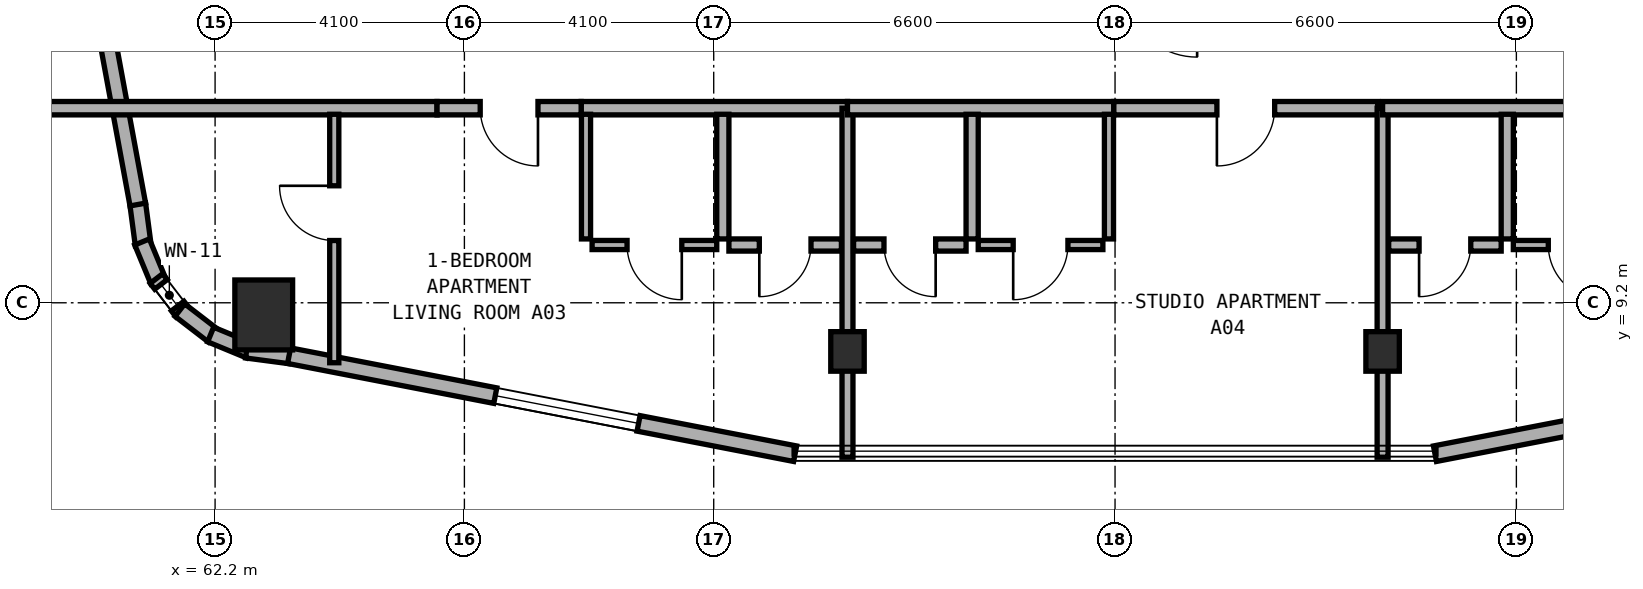
"""IFC4 building model, lengths in metres.
Left out: names, types, materials, properties, quantities, classifications, styles, units other than length and angle.
Written with IfcOpenShell. Run it as: python <this file> out.ifc"""

import sys

from ifc_helpers import new_model, si_unit, direction, frame, frame_2d, origin, origin_2d, place, context, subcontext, project, spatial, rectangle, extrude, element, fill, save


model = new_model("IFC4")
c1 = context("Model", 3, precision=1e-05, world=origin(), true_north=direction((0.0, 1.0)))
c2 = subcontext(c1, "Body", "Model", "MODEL_VIEW")
j1 = project(units=[si_unit("LENGTHUNIT", "METRE"), si_unit("PLANEANGLEUNIT", "RADIAN")], contexts=[c1])
p1 = place(None, origin())
s1 = spatial("IfcSite", under=j1, at=p1, CompositionType="ELEMENT")
p2 = place(p1, origin())
s2 = spatial("IfcBuilding", under=s1, at=p2, CompositionType="ELEMENT")
p3 = place(p2, frame((0.0, 0.0, 109.0)))
s3 = spatial("IfcBuildingStorey", under=s2, at=p3, CompositionType="ELEMENT", Elevation=109.0)
for number, where, z_axis, x_axis in (
    (1, (72.6, 8.4, 0.0), (0.0, 0.0, 1.0), (1.0, 0.0, 0.0)),
    (2, (81.4, 8.4, 0.0), (0.0, 0.0, 1.0), (1.0, 0.0, 0.0)),
):
    element("IfcColumn", number, at=place(p3, frame(where, z_axis=z_axis, x_axis=x_axis)), inside=s3, PredefinedType="COLUMN", context=c2, shape_type="SweptSolid", body=[
        extrude(rectangle(XDim=0.55, YDim=0.65, at=origin_2d()), origin(), (0.0, 0.0, 1.0), 3.5),
    ])
p4 = place(p3, frame((63.0, 9.0, 0.0), z_axis=(0.0, 0.0, 1.0), x_axis=(1.0, 0.0, 0.0)))
e3 = element("IfcColumn", 3, at=p4, inside=s3, PredefinedType="COLUMN", context=c2, shape_type="SweptSolid", body=[
    extrude(rectangle(XDim=0.95, YDim=1.15, at=origin_2d()), origin(), (0.0, 0.0, 1.0), 3.5),
])
p5 = place(p3, frame((60.928, 10.825, 0.0), z_axis=(0.0, 0.0, 1.0), x_axis=(0.131667498923, -0.991293937098, 0.0)))
e4 = element("IfcWall", 4, at=p5, inside=s3, PredefinedType="STANDARD", context=c2, shape_type="SweptSolid", body=[
    extrude(rectangle(XDim=0.677, YDim=0.26, at=frame_2d((0.338, 0.0))), origin(), (0.0, 0.0, 1.0), 3.25),
])
p6 = place(p3, frame((60.999, 10.2, 0.0), z_axis=(0.0, 0.0, 1.0), x_axis=(0.381988976935, -0.924166879681, 0.0)))
e5 = element("IfcWall", 5, at=p6, inside=s3, PredefinedType="STANDARD", context=c2, shape_type="SweptSolid", body=[
    extrude(rectangle(XDim=0.693, YDim=0.26, at=frame_2d((0.347, 0.0))), origin(), (0.0, 0.0, 1.0), 3.25),
])
p7 = place(p3, frame((61.236, 9.599, 0.0), z_axis=(0.0, 0.0, 1.0), x_axis=(0.609472651958, -0.792807092876, 0.0)))
e6 = element("IfcWall", 6, at=p7, inside=s3, PredefinedType="STANDARD", context=c2, shape_type="SweptSolid", body=[
    extrude(rectangle(XDim=0.694, YDim=0.26, at=frame_2d((0.347, 0.0))), origin(), (0.0, 0.0, 1.0), 3.25),
])
p8 = place(p7, frame((0.122, 0.0, 0.85)))
e7 = element("IfcOpeningElement", 7, at=p8, cuts=e6, PredefinedType="OPENING", context=c2, shape_type="SweptSolid", body=[
    extrude(rectangle(XDim=0.45, YDim=1.5, at=frame_2d((0.225, 0.75))), frame((0.0, 0.14, 0.0), z_axis=(0.0, -1.0, 0.0), x_axis=(1.0, 0.0, 0.0)), (0.0, 0.0, 1.0), 0.28),
])
p9 = place(p3, frame((61.621, 9.08, 0.0), z_axis=(0.0, 0.0, 1.0), x_axis=(0.792506234191, -0.609863811657, 0.0)))
e8 = element("IfcWall", 8, at=p9, inside=s3, PredefinedType="STANDARD", context=c2, shape_type="SweptSolid", body=[
    extrude(rectangle(XDim=0.694, YDim=0.26, at=frame_2d((0.347, 0.0))), origin(), (0.0, 0.0, 1.0), 3.25),
])
p10 = place(p3, frame((62.127, 8.678, 0.0), z_axis=(0.0, 0.0, 1.0), x_axis=(0.92421822618, -0.381864727877, 0.0)))
e9 = element("IfcWall", 9, at=p10, inside=s3, PredefinedType="STANDARD", context=c2, shape_type="SweptSolid", body=[
    extrude(rectangle(XDim=0.694, YDim=0.26, at=frame_2d((0.347, 0.0))), origin(), (0.0, 0.0, 1.0), 3.25),
])
p11 = place(p3, frame((62.719, 8.421, 0.0), z_axis=(0.0, 0.0, 1.0), x_axis=(0.991433279471, -0.130614135366, 0.0)))
e10 = element("IfcWall", 10, at=p11, inside=s3, PredefinedType="STANDARD", context=c2, shape_type="SweptSolid", body=[
    extrude(rectangle(XDim=0.712, YDim=0.26, at=frame_2d((0.356, 0.0))), origin(), (0.0, 0.0, 1.0), 3.25),
])
p12 = place(p3, frame((63.417, 8.33, 0.0), z_axis=(0.0, 0.0, 1.0), x_axis=(0.981750199588, -0.190175039396, 0.0)))
e11 = element("IfcWall", 11, at=p12, inside=s3, PredefinedType="STANDARD", context=c2, shape_type="SweptSolid", body=[
    extrude(rectangle(XDim=8.477, YDim=0.26, at=frame_2d((4.238, 0.0))), origin(), (0.0, 0.0, 1.0), 3.25),
])
p13 = place(p12, frame((3.454, 0.0, 0.8)))
e12 = element("IfcOpeningElement", 12, at=p13, cuts=e11, PredefinedType="OPENING", context=c2, shape_type="SweptSolid", body=[
    extrude(rectangle(XDim=2.4, YDim=1.6, at=frame_2d((1.2, 0.8))), frame((0.0, 0.14, 0.0), z_axis=(0.0, -1.0, 0.0), x_axis=(1.0, 0.0, 0.0)), (0.0, 0.0, 1.0), 0.28),
])
p14 = place(p3, frame((82.261, 6.718, 0.0), z_axis=(0.0, 0.0, 1.0), x_axis=(0.981750199588, 0.190175039396, 0.0)))
e13 = element("IfcWall", 13, at=p14, inside=s3, PredefinedType="STANDARD", context=c2, shape_type="SweptSolid", body=[
    extrude(rectangle(XDim=8.477, YDim=0.26, at=frame_2d((4.238, 0.0))), origin(), (0.0, 0.0, 1.0), 3.25),
])
p15 = place(p14, frame((2.623, 0.0, 0.8)))
e14 = element("IfcOpeningElement", 14, at=p15, cuts=e13, PredefinedType="OPENING", context=c2, shape_type="SweptSolid", body=[
    extrude(rectangle(XDim=2.4, YDim=1.6, at=frame_2d((1.2, 0.8))), frame((0.0, 0.14, 0.0), z_axis=(0.0, -1.0, 0.0), x_axis=(1.0, 0.0, 0.0)), (0.0, 0.0, 1.0), 0.28),
])
p16 = place(p3, frame((59.318, 19.558, 0.0), z_axis=(0.0, 0.0, 1.0), x_axis=(0.181209963057, -0.983444431215, 0.0)))
e15 = element("IfcWall", 15, at=p16, inside=s3, PredefinedType="STANDARD", context=c2, shape_type="SweptSolid", body=[
    extrude(rectangle(XDim=8.889, YDim=0.26, at=frame_2d((4.445, 0.0))), origin(), (0.0, 0.0, 1.0), 3.25),
])
p17 = place(p16, frame((1.444, 0.0, 0.8)))
e16 = element("IfcOpeningElement", 16, at=p17, cuts=e15, PredefinedType="OPENING", context=c2, shape_type="SweptSolid", body=[
    extrude(rectangle(XDim=2.4, YDim=1.6, at=frame_2d((1.2, 0.8))), frame((0.0, 0.14, 0.0), z_axis=(0.0, -1.0, 0.0), x_axis=(1.0, 0.0, 0.0)), (0.0, 0.0, 1.0), 0.28),
])
p18 = place(p3, frame((59.36, 12.4, 0.0), z_axis=(0.0, 0.0, 1.0), x_axis=(1.0, 0.0, 0.0)))
e17 = element("IfcWall", 17, at=p18, inside=s3, PredefinedType="SOLIDWALL", context=c2, shape_type="SweptSolid", body=[
    extrude(rectangle(XDim=6.49, YDim=0.22, at=frame_2d((3.245, 0.0))), origin(), (0.0, 0.0, 1.0), 2.945),
])
p19 = place(p3, frame((68.22, 12.4, 0.0), z_axis=(0.0, 0.0, 1.0), x_axis=(1.0, 0.0, 0.0)))
e18 = element("IfcWall", 18, at=p19, inside=s3, PredefinedType="SOLIDWALL", context=c2, shape_type="SweptSolid", body=[
    extrude(rectangle(XDim=4.38, YDim=0.22, at=frame_2d((2.19, 0.0))), origin(), (0.0, 0.0, 1.0), 2.825),
])
p20 = place(p3, frame((65.85, 12.4, 0.0), z_axis=(0.0, 0.0, 1.0), x_axis=(1.0, 0.0, 0.0)))
e19 = element("IfcWall", 19, at=p20, inside=s3, PredefinedType="SOLIDWALL", context=c2, shape_type="SweptSolid", body=[
    extrude(rectangle(XDim=2.37, YDim=0.22, at=frame_2d((1.185, 0.0))), origin(), (0.0, 0.0, 1.0), 3.22),
])
p21 = place(p20, frame((0.71, 0.0, 0.0)))
e20 = element("IfcOpeningElement", 20, at=p21, cuts=e19, PredefinedType="OPENING", context=c2, shape_type="SweptSolid", body=[
    extrude(rectangle(XDim=0.95, YDim=2.1, at=frame_2d((0.475, 1.05))), frame((0.0, 0.12, 0.0), z_axis=(0.0, -1.0, 0.0), x_axis=(1.0, 0.0, 0.0)), (0.0, 0.0, 1.0), 0.24),
])
p22 = place(p3, frame((64.16, 8.214, 0.0), z_axis=(0.0, 0.0, 1.0), x_axis=(0.0, 1.0, 0.0)))
e21 = element("IfcWall", 21, at=p22, inside=s3, PredefinedType="PARTITIONING", context=c2, shape_type="SweptSolid", body=[
    extrude(rectangle(XDim=4.086, YDim=0.15, at=frame_2d((2.043, 0.0))), origin(), (0.0, 0.0, 1.0), 2.945),
])
p23 = place(p22, frame((2.01, 0.0, 0.0)))
e22 = element("IfcOpeningElement", 22, at=p23, cuts=e21, PredefinedType="OPENING", context=c2, shape_type="SweptSolid", body=[
    extrude(rectangle(XDim=0.9, YDim=2.1, at=frame_2d((0.45, 1.05))), frame((0.0, 0.085, 0.0), z_axis=(0.0, -1.0, 0.0), x_axis=(1.0, 0.0, 0.0)), (0.0, 0.0, 1.0), 0.17),
])
p24 = place(p3, frame((70.55, 10.25, 0.0), z_axis=(0.0, 0.0, 1.0), x_axis=(0.0, 1.0, 0.0)))
e23 = element("IfcWall", 23, at=p24, inside=s3, PredefinedType="PLUMBINGWALL", context=c2, shape_type="SweptSolid", body=[
    extrude(rectangle(XDim=2.05, YDim=0.2, at=frame_2d((1.025, 0.0))), origin(), (0.0, 0.0, 1.0), 3.22),
])
p25 = place(p3, frame((68.3, 10.25, 0.0), z_axis=(0.0, 0.0, 1.0), x_axis=(0.0, 1.0, 0.0)))
e24 = element("IfcWall", 24, at=p25, inside=s3, PredefinedType="PARTITIONING", context=c2, shape_type="SweptSolid", body=[
    extrude(rectangle(XDim=2.05, YDim=0.15, at=frame_2d((1.025, 0.0))), origin(), (0.0, 0.0, 1.0), 3.22),
])
p26 = place(p3, frame((70.65, 10.15, 0.0), z_axis=(0.0, 0.0, 1.0), x_axis=(1.0, 0.0, 0.0)))
e25 = element("IfcWall", 25, at=p26, inside=s3, PredefinedType="PLUMBINGWALL", context=c2, shape_type="SweptSolid", body=[
    extrude(rectangle(XDim=1.85, YDim=0.2, at=frame_2d((0.925, 0.0))), origin(), (0.0, 0.0, 1.0), 3.22),
])
p27 = place(p26, frame((0.5, 0.0, 0.0)))
e26 = element("IfcOpeningElement", 26, at=p27, cuts=e25, PredefinedType="OPENING", context=c2, shape_type="SweptSolid", body=[
    extrude(rectangle(XDim=0.85, YDim=2.1, at=frame_2d((0.425, 1.05))), frame((0.0, 0.11, 0.0), z_axis=(0.0, -1.0, 0.0), x_axis=(1.0, 0.0, 0.0)), (0.0, 0.0, 1.0), 0.22),
])
p28 = place(p3, frame((68.4, 10.15, 0.0), z_axis=(0.0, 0.0, 1.0), x_axis=(1.0, 0.0, 0.0)))
e27 = element("IfcWall", 27, at=p28, inside=s3, PredefinedType="PARTITIONING", context=c2, shape_type="SweptSolid", body=[
    extrude(rectangle(XDim=2.05, YDim=0.15, at=frame_2d((1.025, 0.0))), origin(), (0.0, 0.0, 1.0), 3.22),
])
p29 = place(p28, frame((0.575, 0.0, 0.0)))
e28 = element("IfcOpeningElement", 28, at=p29, cuts=e27, PredefinedType="OPENING", context=c2, shape_type="SweptSolid", body=[
    extrude(rectangle(XDim=0.9, YDim=2.1, at=frame_2d((0.45, 1.05))), frame((0.0, 0.085, 0.0), z_axis=(0.0, -1.0, 0.0), x_axis=(1.0, 0.0, 0.0)), (0.0, 0.0, 1.0), 0.17),
])
p30 = place(p3, frame((72.6, 6.66, 0.0), z_axis=(0.0, 0.0, 1.0), x_axis=(0.0, 1.0, 0.0)))
e29 = element("IfcWall", 29, at=p30, inside=s3, PredefinedType="SOLIDWALL", context=c2, shape_type="SweptSolid", body=[
    extrude(rectangle(XDim=5.74, YDim=0.18, at=frame_2d((2.87, 0.0))), origin(), (0.0, 0.0, 1.0), 2.825),
])
p31 = place(p3, frame((72.6, 12.4, 0.0), z_axis=(0.0, 0.0, 1.0), x_axis=(1.0, 0.0, 0.0)))
e30 = element("IfcWall", 30, at=p31, inside=s3, PredefinedType="SOLIDWALL", context=c2, shape_type="SweptSolid", body=[
    extrude(rectangle(XDim=4.38, YDim=0.22, at=frame_2d((2.19, 0.0))), origin(), (0.0, 0.0, 1.0), 2.825),
])
p32 = place(p3, frame((76.98, 12.4, 0.0), z_axis=(0.0, 0.0, 1.0), x_axis=(1.0, 0.0, 0.0)))
e31 = element("IfcWall", 31, at=p32, inside=s3, PredefinedType="SOLIDWALL", context=c2, shape_type="SweptSolid", body=[
    extrude(rectangle(XDim=4.34, YDim=0.22, at=frame_2d((2.17, 0.0))), origin(), (0.0, 0.0, 1.0), 2.825),
])
p33 = place(p32, frame((1.695, 0.0, 0.0)))
e32 = element("IfcOpeningElement", 32, at=p33, cuts=e31, PredefinedType="OPENING", context=c2, shape_type="SweptSolid", body=[
    extrude(rectangle(XDim=0.95, YDim=2.1, at=frame_2d((0.475, 1.05))), frame((0.0, 0.12, 0.0), z_axis=(0.0, -1.0, 0.0), x_axis=(1.0, 0.0, 0.0)), (0.0, 0.0, 1.0), 0.24),
])
p34 = place(p3, frame((74.65, 10.25, 0.0), z_axis=(0.0, 0.0, 1.0), x_axis=(0.0, 1.0, 0.0)))
e33 = element("IfcWall", 33, at=p34, inside=s3, PredefinedType="PLUMBINGWALL", context=c2, shape_type="SweptSolid", body=[
    extrude(rectangle(XDim=2.05, YDim=0.2, at=frame_2d((1.025, 0.0))), origin(), (0.0, 0.0, 1.0), 2.865),
])
p35 = place(p3, frame((76.9, 10.25, 0.0), z_axis=(0.0, 0.0, 1.0), x_axis=(0.0, 1.0, 0.0)))
e34 = element("IfcWall", 34, at=p35, inside=s3, PredefinedType="PARTITIONING", context=c2, shape_type="SweptSolid", body=[
    extrude(rectangle(XDim=2.05, YDim=0.15, at=frame_2d((1.025, 0.0))), origin(), (0.0, 0.0, 1.0), 2.865),
])
p36 = place(p3, frame((72.7, 10.15, 0.0), z_axis=(0.0, 0.0, 1.0), x_axis=(1.0, 0.0, 0.0)))
e35 = element("IfcWall", 35, at=p36, inside=s3, PredefinedType="PLUMBINGWALL", context=c2, shape_type="SweptSolid", body=[
    extrude(rectangle(XDim=1.85, YDim=0.2, at=frame_2d((0.925, 0.0))), origin(), (0.0, 0.0, 1.0), 3.22),
])
p37 = place(p36, frame((0.5, 0.0, 0.0)))
e36 = element("IfcOpeningElement", 36, at=p37, cuts=e35, PredefinedType="OPENING", context=c2, shape_type="SweptSolid", body=[
    extrude(rectangle(XDim=0.85, YDim=2.1, at=frame_2d((0.425, 1.05))), frame((0.0, 0.11, 0.0), z_axis=(0.0, -1.0, 0.0), x_axis=(1.0, 0.0, 0.0)), (0.0, 0.0, 1.0), 0.22),
])
p38 = place(p3, frame((74.75, 10.15, 0.0), z_axis=(0.0, 0.0, 1.0), x_axis=(1.0, 0.0, 0.0)))
e37 = element("IfcWall", 37, at=p38, inside=s3, PredefinedType="PARTITIONING", context=c2, shape_type="SweptSolid", body=[
    extrude(rectangle(XDim=2.05, YDim=0.15, at=frame_2d((1.025, 0.0))), origin(), (0.0, 0.0, 1.0), 3.22),
])
p39 = place(p38, frame((0.575, 0.0, 0.0)))
e38 = element("IfcOpeningElement", 38, at=p39, cuts=e37, PredefinedType="OPENING", context=c2, shape_type="SweptSolid", body=[
    extrude(rectangle(XDim=0.9, YDim=2.1, at=frame_2d((0.45, 1.05))), frame((0.0, 0.085, 0.0), z_axis=(0.0, -1.0, 0.0), x_axis=(1.0, 0.0, 0.0)), (0.0, 0.0, 1.0), 0.17),
])
p40 = place(p3, frame((81.4, 6.66, 0.0), z_axis=(0.0, 0.0, 1.0), x_axis=(0.0, 1.0, 0.0)))
e39 = element("IfcWall", 39, at=p40, inside=s3, PredefinedType="SOLIDWALL", context=c2, shape_type="SweptSolid", body=[
    extrude(rectangle(XDim=5.74, YDim=0.18, at=frame_2d((2.87, 0.0))), origin(), (0.0, 0.0, 1.0), 2.825),
])
p41 = place(p3, frame((81.4, 12.4, 0.0), z_axis=(0.0, 0.0, 1.0), x_axis=(1.0, 0.0, 0.0)))
e40 = element("IfcWall", 40, at=p41, inside=s3, PredefinedType="SOLIDWALL", context=c2, shape_type="SweptSolid", body=[
    extrude(rectangle(XDim=4.38, YDim=0.22, at=frame_2d((2.19, 0.0))), origin(), (0.0, 0.0, 1.0), 2.825),
])
p42 = place(p3, frame((83.45, 10.25, 0.0), z_axis=(0.0, 0.0, 1.0), x_axis=(0.0, 1.0, 0.0)))
e41 = element("IfcWall", 41, at=p42, inside=s3, PredefinedType="PLUMBINGWALL", context=c2, shape_type="SweptSolid", body=[
    extrude(rectangle(XDim=2.05, YDim=0.2, at=frame_2d((1.025, 0.0))), origin(), (0.0, 0.0, 1.0), 3.22),
])
p43 = place(p3, frame((81.5, 10.15, 0.0), z_axis=(0.0, 0.0, 1.0), x_axis=(1.0, 0.0, 0.0)))
e42 = element("IfcWall", 42, at=p43, inside=s3, PredefinedType="PLUMBINGWALL", context=c2, shape_type="SweptSolid", body=[
    extrude(rectangle(XDim=1.85, YDim=0.2, at=frame_2d((0.925, 0.0))), origin(), (0.0, 0.0, 1.0), 2.825),
])
p44 = place(p43, frame((0.5, 0.0, 0.0)))
e43 = element("IfcOpeningElement", 43, at=p44, cuts=e42, PredefinedType="OPENING", context=c2, shape_type="SweptSolid", body=[
    extrude(rectangle(XDim=0.85, YDim=2.1, at=frame_2d((0.425, 1.05))), frame((0.0, 0.11, 0.0), z_axis=(0.0, -1.0, 0.0), x_axis=(1.0, 0.0, 0.0)), (0.0, 0.0, 1.0), 0.22),
])
p45 = place(p3, frame((83.55, 10.15, 0.0), z_axis=(0.0, 0.0, 1.0), x_axis=(1.0, 0.0, 0.0)))
e44 = element("IfcWall", 44, at=p45, inside=s3, PredefinedType="PARTITIONING", context=c2, shape_type="SweptSolid", body=[
    extrude(rectangle(XDim=2.05, YDim=0.15, at=frame_2d((1.025, 0.0))), origin(), (0.0, 0.0, 1.0), 3.22),
])
p46 = place(p45, frame((0.575, 0.0, 0.0)))
e45 = element("IfcOpeningElement", 45, at=p46, cuts=e44, PredefinedType="OPENING", context=c2, shape_type="SweptSolid", body=[
    extrude(rectangle(XDim=0.9, YDim=2.1, at=frame_2d((0.45, 1.05))), frame((0.0, 0.085, 0.0), z_axis=(0.0, -1.0, 0.0), x_axis=(1.0, 0.0, 0.0)), (0.0, 0.0, 1.0), 0.17),
])
p47 = place(p13, origin())
e46 = element("IfcWindow", 46, at=p47, inside=s3, PartitioningType="SINGLE_PANEL", PredefinedType="WINDOW", context=c2, shape_type="SweptSolid", body=[
    extrude(rectangle(XDim=2.4, YDim=1.6, at=frame_2d((1.2, 0.8))), frame((0.0, 0.03, 0.0), z_axis=(0.0, -1.0, 0.0), x_axis=(1.0, 0.0, 0.0)), (0.0, 0.0, 1.0), 0.06),
])
fill(e12, e46)
p48 = place(p8, origin())
e47 = element("IfcWindow", 47, at=p48, inside=s3, PartitioningType="SINGLE_PANEL", PredefinedType="WINDOW", context=c2, shape_type="SweptSolid", body=[
    extrude(rectangle(XDim=0.45, YDim=1.5, at=frame_2d((0.225, 0.75))), frame((0.0, 0.03, 0.0), z_axis=(0.0, -1.0, 0.0), x_axis=(1.0, 0.0, 0.0)), (0.0, 0.0, 1.0), 0.06),
])
fill(e7, e47)
p49 = place(p21, frame((0.95, 0.0, 0.0), z_axis=(0.0, 0.0, 1.0), x_axis=(-1.0, 0.0, 0.0)))
e48 = element("IfcDoor", 48, at=p49, inside=s3, OperationType="SINGLE_SWING_LEFT", PredefinedType="DOOR", context=c2, shape_type="SweptSolid", body=[
    extrude(rectangle(XDim=0.95, YDim=2.1, at=frame_2d((0.475, 1.05))), frame((0.0, 0.025, 0.0), z_axis=(0.0, -1.0, 0.0), x_axis=(1.0, 0.0, 0.0)), (0.0, 0.0, 1.0), 0.05),
])
fill(e20, e48)
p50 = place(p23, origin())
e49 = element("IfcDoor", 49, at=p50, inside=s3, OperationType="SINGLE_SWING_RIGHT", PredefinedType="DOOR", context=c2, shape_type="SweptSolid", body=[
    extrude(rectangle(XDim=0.9, YDim=2.1, at=frame_2d((0.45, 1.05))), frame((0.0, 0.025, 0.0), z_axis=(0.0, -1.0, 0.0), x_axis=(1.0, 0.0, 0.0)), (0.0, 0.0, 1.0), 0.05),
])
fill(e22, e49)
p51 = place(p27, frame((0.85, 0.0, 0.0), z_axis=(0.0, 0.0, 1.0), x_axis=(-1.0, 0.0, 0.0)))
e50 = element("IfcDoor", 50, at=p51, inside=s3, OperationType="SINGLE_SWING_RIGHT", PredefinedType="DOOR", context=c2, shape_type="SweptSolid", body=[
    extrude(rectangle(XDim=0.85, YDim=2.1, at=frame_2d((0.425, 1.05))), frame((0.0, 0.025, 0.0), z_axis=(0.0, -1.0, 0.0), x_axis=(1.0, 0.0, 0.0)), (0.0, 0.0, 1.0), 0.05),
])
fill(e26, e50)
p52 = place(p29, frame((0.9, 0.0, 0.0), z_axis=(0.0, 0.0, 1.0), x_axis=(-1.0, 0.0, 0.0)))
e51 = element("IfcDoor", 51, at=p52, inside=s3, OperationType="SINGLE_SWING_LEFT", PredefinedType="DOOR", context=c2, shape_type="SweptSolid", body=[
    extrude(rectangle(XDim=0.9, YDim=2.1, at=frame_2d((0.45, 1.05))), frame((0.0, 0.025, 0.0), z_axis=(0.0, -1.0, 0.0), x_axis=(1.0, 0.0, 0.0)), (0.0, 0.0, 1.0), 0.05),
])
fill(e28, e51)
p53 = place(p33, frame((0.95, 0.0, 0.0), z_axis=(0.0, 0.0, 1.0), x_axis=(-1.0, 0.0, 0.0)))
e52 = element("IfcDoor", 52, at=p53, inside=s3, OperationType="SINGLE_SWING_RIGHT", PredefinedType="DOOR", context=c2, shape_type="SweptSolid", body=[
    extrude(rectangle(XDim=0.95, YDim=2.1, at=frame_2d((0.475, 1.05))), frame((0.0, 0.025, 0.0), z_axis=(0.0, -1.0, 0.0), x_axis=(1.0, 0.0, 0.0)), (0.0, 0.0, 1.0), 0.05),
])
fill(e32, e52)
p54 = place(p37, frame((0.85, 0.0, 0.0), z_axis=(0.0, 0.0, 1.0), x_axis=(-1.0, 0.0, 0.0)))
e53 = element("IfcDoor", 53, at=p54, inside=s3, OperationType="SINGLE_SWING_LEFT", PredefinedType="DOOR", context=c2, shape_type="SweptSolid", body=[
    extrude(rectangle(XDim=0.85, YDim=2.1, at=frame_2d((0.425, 1.05))), frame((0.0, 0.025, 0.0), z_axis=(0.0, -1.0, 0.0), x_axis=(1.0, 0.0, 0.0)), (0.0, 0.0, 1.0), 0.05),
])
fill(e36, e53)
p55 = place(p39, frame((0.9, 0.0, 0.0), z_axis=(0.0, 0.0, 1.0), x_axis=(-1.0, 0.0, 0.0)))
e54 = element("IfcDoor", 54, at=p55, inside=s3, OperationType="SINGLE_SWING_RIGHT", PredefinedType="DOOR", context=c2, shape_type="SweptSolid", body=[
    extrude(rectangle(XDim=0.9, YDim=2.1, at=frame_2d((0.45, 1.05))), frame((0.0, 0.025, 0.0), z_axis=(0.0, -1.0, 0.0), x_axis=(1.0, 0.0, 0.0)), (0.0, 0.0, 1.0), 0.05),
])
fill(e38, e54)
p56 = place(p44, frame((0.85, 0.0, 0.0), z_axis=(0.0, 0.0, 1.0), x_axis=(-1.0, 0.0, 0.0)))
e55 = element("IfcDoor", 55, at=p56, inside=s3, OperationType="SINGLE_SWING_RIGHT", PredefinedType="DOOR", context=c2, shape_type="SweptSolid", body=[
    extrude(rectangle(XDim=0.85, YDim=2.1, at=frame_2d((0.425, 1.05))), frame((0.0, 0.025, 0.0), z_axis=(0.0, -1.0, 0.0), x_axis=(1.0, 0.0, 0.0)), (0.0, 0.0, 1.0), 0.05),
])
fill(e43, e55)
p57 = place(p46, frame((0.9, 0.0, 0.0), z_axis=(0.0, 0.0, 1.0), x_axis=(-1.0, 0.0, 0.0)))
e56 = element("IfcDoor", 56, at=p57, inside=s3, OperationType="SINGLE_SWING_LEFT", PredefinedType="DOOR", context=c2, shape_type="SweptSolid", body=[
    extrude(rectangle(XDim=0.9, YDim=2.1, at=frame_2d((0.45, 1.05))), frame((0.0, 0.025, 0.0), z_axis=(0.0, -1.0, 0.0), x_axis=(1.0, 0.0, 0.0)), (0.0, 0.0, 1.0), 0.05),
])
fill(e45, e56)
save(model, sys.argv[1])
